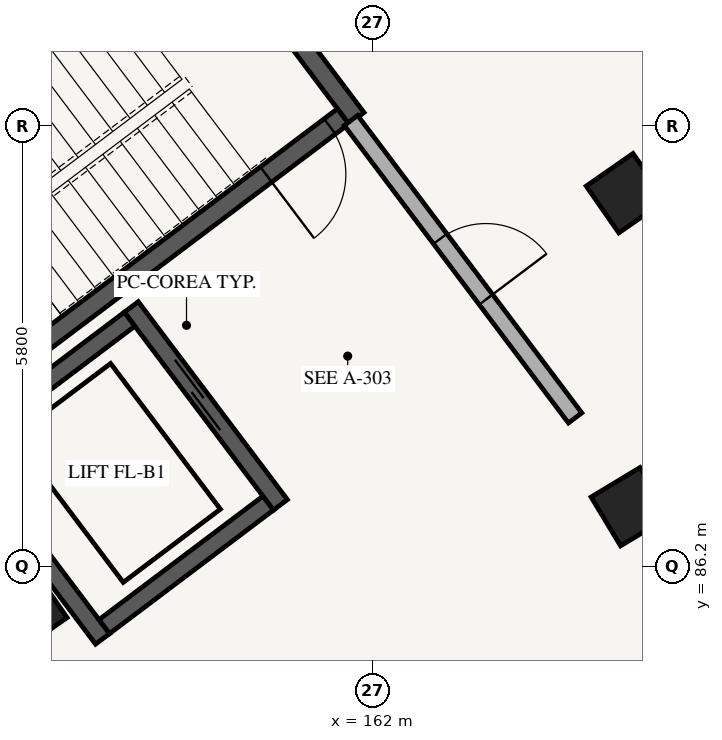
"""IFC4 building model, lengths in metres.
Left out: names, types, materials, properties, quantities, classifications, styles, units other than length and angle.
Written with IfcOpenShell. Run it as: python <this file> out.ifc"""

import sys

from ifc_helpers import new_model, si_unit, direction, frame, frame_2d, origin, origin_2d, place, context, subcontext, project, spatial, rectangle, extrude, element, fill, save


model = new_model("IFC4")
c1 = context("Model", 3, precision=1e-05, world=origin(), true_north=direction((0.0, 1.0)))
c2 = subcontext(c1, "Body", "Model", "MODEL_VIEW")
j1 = project(units=[si_unit("LENGTHUNIT", "METRE"), si_unit("PLANEANGLEUNIT", "RADIAN")], contexts=[c1])
p1 = place(None, origin())
s1 = spatial("IfcSite", under=j1, at=p1, CompositionType="ELEMENT")
p2 = place(p1, origin())
s2 = spatial("IfcBuilding", under=s1, at=p2, CompositionType="ELEMENT")
p3 = place(p2, frame((0.0, 0.0, -4.2)))
s3 = spatial("IfcBuildingStorey", under=s2, at=p3, CompositionType="ELEMENT", Elevation=-4.2)
p4 = place(p3, frame((159.707, 94.658, 0.0), z_axis=(0.0, 0.0, 1.0), x_axis=(-0.798639633744, -0.601809550782, 0.0)))
e1 = element("IfcWall", 1, at=p4, inside=s3, PredefinedType="SHEAR", context=c2, shape_type="SweptSolid", body=[
    extrude(rectangle(XDim=6.6, YDim=0.25, at=frame_2d((3.3, 0.0))), origin(), (0.0, 0.0, 1.0), 3.92),
])
p5 = place(p3, frame((159.731, 94.833, 0.0), z_axis=(0.0, 0.0, 1.0), x_axis=(0.601814606132, -0.798635824294, 0.0)))
e2 = element("IfcWall", 2, at=p5, inside=s3, PredefinedType="SHEAR", context=c2, shape_type="SweptSolid", body=[
    extrude(rectangle(XDim=3.42, YDim=0.25, at=frame_2d((1.71, 0.0))), origin(), (0.0, 0.0, 1.0), 3.92),
])
p6 = place(p3, frame((161.615, 92.126, 0.0), z_axis=(0.0, 0.0, 1.0), x_axis=(-0.798639633744, -0.601809550782, 0.0)))
e3 = element("IfcWall", 3, at=p6, inside=s3, PredefinedType="SHEAR", context=c2, shape_type="SweptSolid", body=[
    extrude(rectangle(XDim=6.6, YDim=0.25, at=frame_2d((3.3, 0.0))), origin(), (0.0, 0.0, 1.0), 3.92),
])
p7 = place(p6, frame((0.22, 0.0, 0.0)))
e4 = element("IfcOpeningElement", 4, at=p7, cuts=e3, PredefinedType="OPENING", context=c2, shape_type="SweptSolid", body=[
    extrude(rectangle(XDim=1.05, YDim=2.15, at=frame_2d((0.525, 1.075))), frame((0.0, 0.135, 0.0), z_axis=(0.0, -1.0, 0.0), x_axis=(1.0, 0.0, 0.0)), (0.0, 0.0, 1.0), 0.27),
])
p8 = place(p3, frame((158.827, 89.619, 0.0), z_axis=(0.0, 0.0, 1.0), x_axis=(0.601819781152, -0.798631924615, 0.0)))
e5 = element("IfcWall", 5, at=p8, inside=s3, PredefinedType="SHEAR", context=c2, shape_type="SweptSolid", body=[
    extrude(rectangle(XDim=3.26, YDim=0.23, at=frame_2d((1.63, 0.0))), origin(), (0.0, 0.0, 1.0), 3.92),
])
p9 = place(p8, frame((0.9, 0.0, 0.0)))
e6 = element("IfcOpeningElement", 6, at=p9, cuts=e5, PredefinedType="OPENING", context=c2, shape_type="SweptSolid", body=[
    extrude(rectangle(XDim=1.1, YDim=2.15, at=frame_2d((0.55, 1.075))), frame((0.0, 0.125, 0.0), z_axis=(0.0, -1.0, 0.0), x_axis=(1.0, 0.0, 0.0)), (0.0, 0.0, 1.0), 0.25),
])
p10 = place(p3, frame((156.487, 87.856, 0.0), z_axis=(0.0, 0.0, 1.0), x_axis=(0.601819781152, -0.798631924615, 0.0)))
e7 = element("IfcWall", 7, at=p10, inside=s3, PredefinedType="SHEAR", context=c2, shape_type="SweptSolid", body=[
    extrude(rectangle(XDim=3.26, YDim=0.23, at=frame_2d((1.63, 0.0))), origin(), (0.0, 0.0, 1.0), 3.92),
])
for number, where, z_axis, x_axis in (
    (8, (158.805, 89.458, 0.0), (0.0, 0.0, 1.0), (-0.799, -0.602, 0.0)),
    (9, (160.628, 87.038, 0.0), (0.0, 0.0, 1.0), (-0.799, -0.602, 0.0)),
):
    element("IfcWall", number, at=place(p3, frame(where, z_axis=z_axis, x_axis=x_axis)), inside=s3, PredefinedType="SHEAR", context=c2, shape_type="SweptSolid", body=[
        extrude(rectangle(XDim=2.7, YDim=0.23, at=frame_2d((1.35, 0.0))), origin(), (0.0, 0.0, 1.0), 3.92),
    ])
for number, where, z_axis, x_axis in (
    (10, (165.392, 86.991, 0.0), (0.0, 0.0, 1.0), (0.856, 0.517, 0.0)),
    (11, (157.461, 85.625, 0.0), (0.0, 0.0, 1.0), (0.82, 0.572, 0.0)),
    (12, (165.335, 91.116, 0.0), (0.0, 0.0, 1.0), (0.82, 0.572, 0.0)),
):
    element("IfcColumn", number, at=place(p3, frame(where, z_axis=z_axis, x_axis=x_axis)), inside=s3, PredefinedType="COLUMN", context=c2, shape_type="SweptSolid", body=[
        extrude(rectangle(XDim=0.75, YDim=0.75, at=origin_2d()), origin(), (0.0, 0.0, 1.0), 3.92),
    ])
p11 = place(p3, frame((161.718, 92.073, 0.0), z_axis=(0.0, 0.0, 1.0), x_axis=(0.601792209296, -0.79865270101, 0.0)))
e13 = element("IfcWall", 13, at=p11, inside=s3, PredefinedType="PARTITIONING", context=c2, shape_type="SweptSolid", body=[
    extrude(rectangle(XDim=4.9, YDim=0.22, at=frame_2d((2.45, 0.0))), origin(), (0.0, 0.0, 1.0), 3.18),
])
p12 = place(p11, frame((1.95, 0.0, 0.0)))
e14 = element("IfcOpeningElement", 14, at=p12, cuts=e13, PredefinedType="OPENING", context=c2, shape_type="SweptSolid", body=[
    extrude(rectangle(XDim=1.0, YDim=2.15, at=frame_2d((0.5, 1.075))), frame((0.0, 0.12, 0.0), z_axis=(0.0, -1.0, 0.0), x_axis=(1.0, 0.0, 0.0)), (0.0, 0.0, 1.0), 0.24),
])
p13 = place(p7, origin())
e15 = element("IfcDoor", 15, at=p13, inside=s3, OperationType="SINGLE_SWING_RIGHT", PredefinedType="DOOR", context=c2, shape_type="SweptSolid", body=[
    extrude(rectangle(XDim=1.05, YDim=2.15, at=frame_2d((0.525, 1.075))), frame((0.0, 0.025, 0.0), z_axis=(0.0, -1.0, 0.0), x_axis=(1.0, 0.0, 0.0)), (0.0, 0.0, 1.0), 0.05),
])
fill(e4, e15)
p14 = place(p9, origin())
e16 = element("IfcDoor", 16, at=p14, inside=s3, OperationType="DOUBLE_DOOR_SLIDING", PredefinedType="DOOR", context=c2, shape_type="SweptSolid", body=[
    extrude(rectangle(XDim=1.1, YDim=2.15, at=frame_2d((0.55, 1.075))), frame((0.0, 0.025, 0.0), z_axis=(0.0, -1.0, 0.0), x_axis=(1.0, 0.0, 0.0)), (0.0, 0.0, 1.0), 0.05),
])
fill(e6, e16)
p15 = place(p12, origin())
e17 = element("IfcDoor", 17, at=p15, inside=s3, OperationType="SINGLE_SWING_RIGHT", PredefinedType="DOOR", context=c2, shape_type="SweptSolid", body=[
    extrude(rectangle(XDim=1.0, YDim=2.15, at=frame_2d((0.5, 1.075))), frame((0.0, 0.025, 0.0), z_axis=(0.0, -1.0, 0.0), x_axis=(1.0, 0.0, 0.0)), (0.0, 0.0, 1.0), 0.05),
])
fill(e14, e17)
save(model, sys.argv[1])
